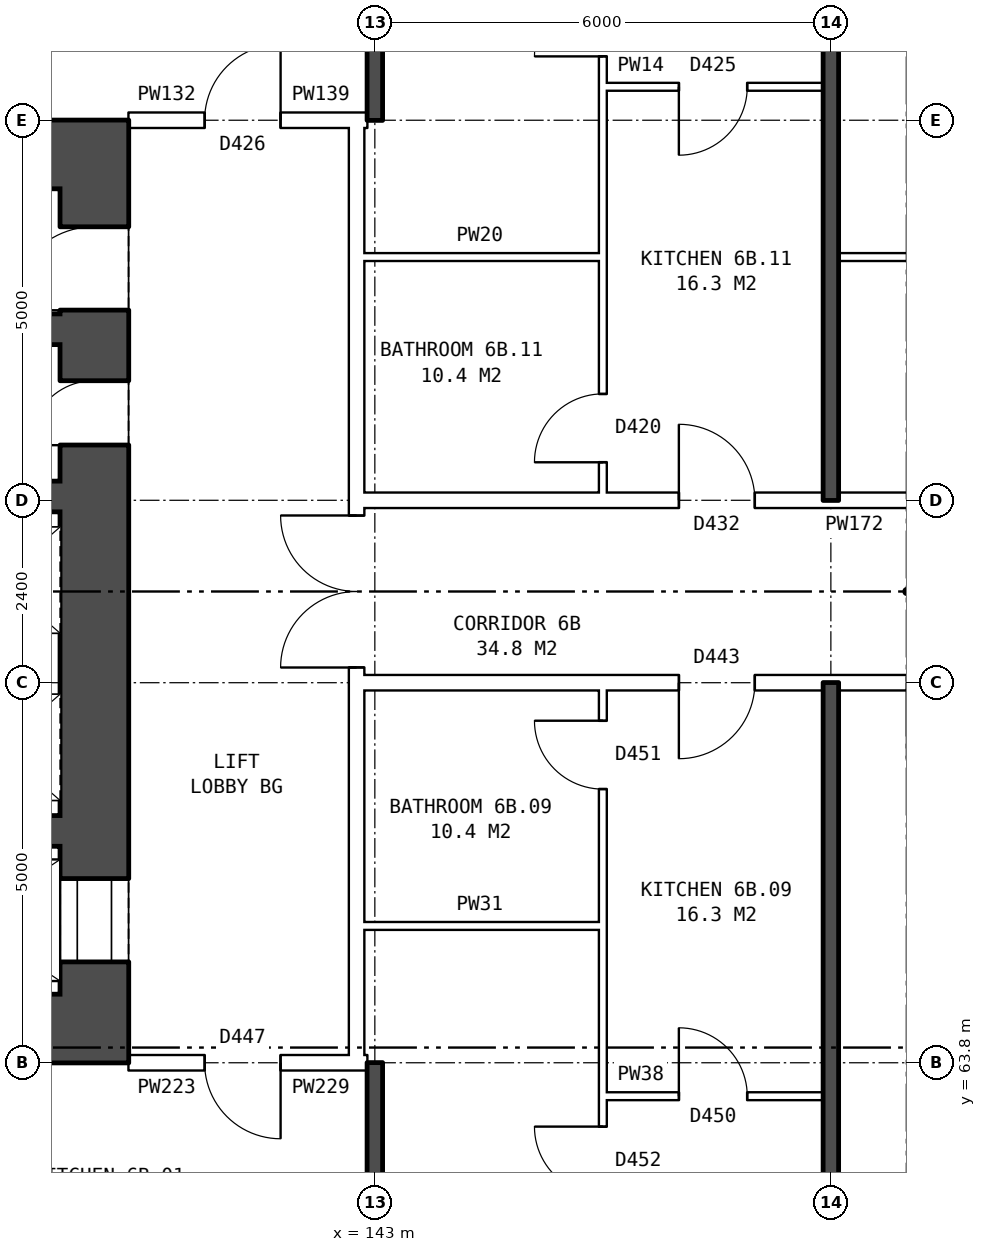
"""IFC4 building model, lengths in metres.
Left out: names, types, materials, properties, quantities, classifications, styles, units other than length and angle.
Written with IfcOpenShell. Run it as: python <this file> out.ifc"""

import sys

from ifc_helpers import new_model, si_unit, direction, frame, frame_2d, origin, place, context, subcontext, project, spatial, rectangle, extrude, element, fill, save


model = new_model("IFC4")
c1 = context("Model", 3, precision=1e-05, world=origin(), true_north=direction((0.0, 1.0)))
c2 = subcontext(c1, "Body", "Model", "MODEL_VIEW")
j1 = project(units=[si_unit("LENGTHUNIT", "METRE"), si_unit("PLANEANGLEUNIT", "RADIAN")], contexts=[c1])
p1 = place(None, origin())
s1 = spatial("IfcSite", under=j1, at=p1, CompositionType="ELEMENT")
p2 = place(p1, origin())
s2 = spatial("IfcBuilding", under=s1, at=p2, CompositionType="ELEMENT")
p3 = place(p2, frame((0.0, 0.0, 25.7)))
s3 = spatial("IfcBuildingStorey", under=s2, at=p3, CompositionType="ELEMENT", Elevation=25.7)
p4 = place(p3, frame((139.31, 64.7, 0.0), z_axis=(0.0, 0.0, 1.0), x_axis=(0.0, 1.0, 0.0)))
e1 = element("IfcWall", 1, at=p4, inside=s3, PredefinedType="SHEAR", context=c2, shape_type="SweptSolid", body=[
    extrude(rectangle(XDim=10.6, YDim=0.9, at=frame_2d((5.3, 0.0))), origin(), (0.0, 0.0, 1.0), 2.85),
])
p5 = place(p4, frame((0.425, 0.0, 0.0)))
e2 = element("IfcOpeningElement", 2, at=p5, cuts=e1, PredefinedType="OPENING", context=c2, shape_type="SweptSolid", body=[
    extrude(rectangle(XDim=1.1, YDim=2.1, at=frame_2d((0.55, 1.05))), frame((0.0, 0.46, 0.0), z_axis=(0.0, -1.0, 0.0), x_axis=(1.0, 0.0, 0.0)), (0.0, 0.0, 1.0), 0.92),
])
p6 = place(p4, frame((9.0, 0.0, 0.0)))
e3 = element("IfcOpeningElement", 3, at=p6, cuts=e1, PredefinedType="OPENING", context=c2, shape_type="SweptSolid", body=[
    extrude(rectangle(XDim=1.1, YDim=2.1, at=frame_2d((0.55, 1.05))), frame((0.0, 0.46, 0.0), z_axis=(0.0, -1.0, 0.0), x_axis=(1.0, 0.0, 0.0)), (0.0, 0.0, 1.0), 0.92),
])
p7 = place(p4, frame((7.225, 0.0, 0.0)))
e4 = element("IfcOpeningElement", 4, at=p7, cuts=e1, PredefinedType="OPENING", context=c2, shape_type="SweptSolid", body=[
    extrude(rectangle(XDim=0.85, YDim=2.1, at=frame_2d((0.425, 1.05))), frame((0.0, 0.46, 0.0), z_axis=(0.0, -1.0, 0.0), x_axis=(1.0, 0.0, 0.0)), (0.0, 0.0, 1.0), 0.92),
])
for number, where, z_axis, x_axis in (
    (5, (139.76, 64.25, 0.0), (0.0, 0.0, 1.0), (-1.0, 0.0, 0.0)),
    (6, (139.76, 75.75, 0.0), (0.0, 0.0, 1.0), (-1.0, 0.0, 0.0)),
):
    element("IfcWall", number, at=place(p3, frame(where, z_axis=z_axis, x_axis=x_axis)), inside=s3, PredefinedType="SHEAR", context=c2, shape_type="SweptSolid", body=[
        extrude(rectangle(XDim=8.4, YDim=0.9, at=frame_2d((4.2, 0.0))), origin(), (0.0, 0.0, 1.0), 2.85),
    ])
p8 = place(p3, frame((138.86, 66.85, 0.0), z_axis=(0.0, 0.0, 1.0), x_axis=(-1.0, 0.0, 0.0)))
e7 = element("IfcWall", 7, at=p8, inside=s3, PredefinedType="SHEAR", context=c2, shape_type="SweptSolid", body=[
    extrude(rectangle(XDim=3.7, YDim=0.4, at=frame_2d((1.85, 0.0))), origin(), (0.0, 0.0, 1.0), 2.85),
])
p9 = place(p3, frame((138.86, 71.25, 0.0), z_axis=(0.0, 0.0, 1.0), x_axis=(-1.0, 0.0, 0.0)))
e8 = element("IfcWall", 8, at=p9, inside=s3, PredefinedType="SHEAR", context=c2, shape_type="SweptSolid", body=[
    extrude(rectangle(XDim=6.6, YDim=0.4, at=frame_2d((3.3, 0.0))), origin(), (0.0, 0.0, 1.0), 2.85),
])
p10 = place(p9, frame((4.25, 0.0, 0.0)))
e9 = element("IfcOpeningElement", 9, at=p10, cuts=e8, PredefinedType="OPENING", context=c2, shape_type="SweptSolid", body=[
    extrude(rectangle(XDim=1.1, YDim=2.1, at=frame_2d((0.55, 1.05))), frame((0.0, 0.21, 0.0), z_axis=(0.0, -1.0, 0.0), x_axis=(1.0, 0.0, 0.0)), (0.0, 0.0, 1.0), 0.42),
])
p11 = place(p9, frame((2.475, 0.0, 0.0)))
e10 = element("IfcOpeningElement", 10, at=p11, cuts=e8, PredefinedType="OPENING", context=c2, shape_type="SweptSolid", body=[
    extrude(rectangle(XDim=0.85, YDim=2.1, at=frame_2d((0.425, 1.05))), frame((0.0, 0.21, 0.0), z_axis=(0.0, -1.0, 0.0), x_axis=(1.0, 0.0, 0.0)), (0.0, 0.0, 1.0), 0.42),
])
p12 = place(p3, frame((138.86, 73.45, 0.0), z_axis=(0.0, 0.0, 1.0), x_axis=(-1.0, 0.0, 0.0)))
e11 = element("IfcWall", 11, at=p12, inside=s3, PredefinedType="SHEAR", context=c2, shape_type="SweptSolid", body=[
    extrude(rectangle(XDim=1.95, YDim=0.4, at=frame_2d((0.975, 0.0))), origin(), (0.0, 0.0, 1.0), 2.85),
])
p13 = place(p3, frame((142.76, 63.9, 0.0), z_axis=(0.0, 0.0, 1.0), x_axis=(0.0, 1.0, 0.0)))
e12 = element("IfcWall", 12, at=p13, inside=s3, PredefinedType="PARTITIONING", context=c2, shape_type="SweptSolid", body=[
    extrude(rectangle(XDim=12.2, YDim=0.2, at=frame_2d((6.1, 0.0))), origin(), (0.0, 0.0, 1.0), 2.85),
])
p14 = place(p13, frame((5.1, 0.0, 0.0)))
e13 = element("IfcOpeningElement", 13, at=p14, cuts=e12, PredefinedType="OPENING", context=c2, shape_type="SweptSolid", body=[
    extrude(rectangle(XDim=2.0, YDim=2.1, at=frame_2d((1.0, 1.05))), frame((0.0, 0.11, 0.0), z_axis=(0.0, -1.0, 0.0), x_axis=(1.0, 0.0, 0.0)), (0.0, 0.0, 1.0), 0.22),
])
p15 = place(p3, frame((146.0, 63.36, 0.0), z_axis=(0.0, 0.0, 1.0), x_axis=(1.0, 0.0, 0.0)))
e14 = element("IfcWall", 14, at=p15, inside=s3, PredefinedType="PARTITIONING", context=c2, shape_type="SweptSolid", body=[
    extrude(rectangle(XDim=2.9, YDim=0.1, at=frame_2d((1.45, 0.0))), origin(), (0.0, 0.0, 1.0), 2.85),
])
p16 = place(p15, frame((1.0, 0.0, 0.0)))
e15 = element("IfcOpeningElement", 15, at=p16, cuts=e14, PredefinedType="OPENING", context=c2, shape_type="SweptSolid", body=[
    extrude(rectangle(XDim=0.9, YDim=2.1, at=frame_2d((0.45, 1.05))), frame((0.0, 0.06, 0.0), z_axis=(0.0, -1.0, 0.0), x_axis=(1.0, 0.0, 0.0)), (0.0, 0.0, 1.0), 0.12),
])
p17 = place(p3, frame((139.76, 63.8, 0.0), z_axis=(0.0, 0.0, 1.0), x_axis=(1.0, 0.0, 0.0)))
e16 = element("IfcWall", 16, at=p17, inside=s3, PredefinedType="PARTITIONING", context=c2, shape_type="SweptSolid", body=[
    extrude(rectangle(XDim=3.0, YDim=0.2, at=frame_2d((1.5, 0.0))), origin(), (0.0, 0.0, 1.0), 2.85),
])
p18 = place(p17, frame((1.0, 0.0, 0.0)))
e17 = element("IfcOpeningElement", 17, at=p18, cuts=e16, PredefinedType="OPENING", context=c2, shape_type="SweptSolid", body=[
    extrude(rectangle(XDim=1.0, YDim=2.1, at=frame_2d((0.5, 1.05))), frame((0.0, 0.11, 0.0), z_axis=(0.0, -1.0, 0.0), x_axis=(1.0, 0.0, 0.0)), (0.0, 0.0, 1.0), 0.22),
])
p19 = place(p3, frame((142.76, 63.8, 0.0), z_axis=(0.0, 0.0, 1.0), x_axis=(1.0, 0.0, 0.0)))
e18 = element("IfcWall", 18, at=p19, inside=s3, PredefinedType="PARTITIONING", context=c2, shape_type="SweptSolid", body=[
    extrude(rectangle(XDim=0.14, YDim=0.2, at=frame_2d((0.07, 0.0))), origin(), (0.0, 0.0, 1.0), 2.85),
])
p20 = place(p3, frame((142.76, 65.6, 0.0), z_axis=(0.0, 0.0, 1.0), x_axis=(1.0, 0.0, 0.0)))
e19 = element("IfcWall", 19, at=p20, inside=s3, PredefinedType="PARTITIONING", context=c2, shape_type="SweptSolid", body=[
    extrude(rectangle(XDim=3.24, YDim=0.1, at=frame_2d((1.62, 0.0))), origin(), (0.0, 0.0, 1.0), 2.85),
])
p21 = place(p3, frame((142.76, 68.8, 0.0), z_axis=(0.0, 0.0, 1.0), x_axis=(1.0, 0.0, 0.0)))
e20 = element("IfcWall", 20, at=p21, inside=s3, PredefinedType="PARTITIONING", context=c2, shape_type="SweptSolid", body=[
    extrude(rectangle(XDim=14.48, YDim=0.2, at=frame_2d((7.24, 0.0))), origin(), (0.0, 0.0, 1.0), 2.85),
])
p22 = place(p21, frame((4.24, 0.0, 0.0)))
e21 = element("IfcOpeningElement", 21, at=p22, cuts=e20, PredefinedType="OPENING", context=c2, shape_type="SweptSolid", body=[
    extrude(rectangle(XDim=1.0, YDim=2.1, at=frame_2d((0.5, 1.05))), frame((0.0, 0.11, 0.0), z_axis=(0.0, -1.0, 0.0), x_axis=(1.0, 0.0, 0.0)), (0.0, 0.0, 1.0), 0.22),
])
p23 = place(p21, frame((7.24, 0.0, 0.0)))
e22 = element("IfcOpeningElement", 22, at=p23, cuts=e20, PredefinedType="OPENING", context=c2, shape_type="SweptSolid", body=[
    extrude(rectangle(XDim=1.0, YDim=2.1, at=frame_2d((0.5, 1.05))), frame((0.0, 0.11, 0.0), z_axis=(0.0, -1.0, 0.0), x_axis=(1.0, 0.0, 0.0)), (0.0, 0.0, 1.0), 0.22),
])
p24 = place(p3, frame((142.76, 71.2, 0.0), z_axis=(0.0, 0.0, 1.0), x_axis=(1.0, 0.0, 0.0)))
e23 = element("IfcWall", 23, at=p24, inside=s3, PredefinedType="PARTITIONING", context=c2, shape_type="SweptSolid", body=[
    extrude(rectangle(XDim=14.48, YDim=0.2, at=frame_2d((7.24, 0.0))), origin(), (0.0, 0.0, 1.0), 2.85),
])
p25 = place(p24, frame((4.24, 0.0, 0.0)))
e24 = element("IfcOpeningElement", 24, at=p25, cuts=e23, PredefinedType="OPENING", context=c2, shape_type="SweptSolid", body=[
    extrude(rectangle(XDim=1.0, YDim=2.1, at=frame_2d((0.5, 1.05))), frame((0.0, 0.11, 0.0), z_axis=(0.0, -1.0, 0.0), x_axis=(1.0, 0.0, 0.0)), (0.0, 0.0, 1.0), 0.22),
])
p26 = place(p24, frame((10.24, 0.0, 0.0)))
e25 = element("IfcOpeningElement", 25, at=p26, cuts=e23, PredefinedType="OPENING", context=c2, shape_type="SweptSolid", body=[
    extrude(rectangle(XDim=1.0, YDim=2.1, at=frame_2d((0.5, 1.05))), frame((0.0, 0.11, 0.0), z_axis=(0.0, -1.0, 0.0), x_axis=(1.0, 0.0, 0.0)), (0.0, 0.0, 1.0), 0.22),
])
p27 = place(p3, frame((142.76, 74.4, 0.0), z_axis=(0.0, 0.0, 1.0), x_axis=(1.0, 0.0, 0.0)))
e26 = element("IfcWall", 26, at=p27, inside=s3, PredefinedType="PARTITIONING", context=c2, shape_type="SweptSolid", body=[
    extrude(rectangle(XDim=3.24, YDim=0.1, at=frame_2d((1.62, 0.0))), origin(), (0.0, 0.0, 1.0), 2.85),
])
p28 = place(p3, frame((149.1, 74.4, 0.0), z_axis=(0.0, 0.0, 1.0), x_axis=(1.0, 0.0, 0.0)))
e27 = element("IfcWall", 27, at=p28, inside=s3, PredefinedType="PARTITIONING", context=c2, shape_type="SweptSolid", body=[
    extrude(rectangle(XDim=2.9, YDim=0.1, at=frame_2d((1.45, 0.0))), origin(), (0.0, 0.0, 1.0), 2.85),
])
p29 = place(p3, frame((139.76, 76.2, 0.0), z_axis=(0.0, 0.0, 1.0), x_axis=(1.0, 0.0, 0.0)))
e28 = element("IfcWall", 28, at=p29, inside=s3, PredefinedType="PARTITIONING", context=c2, shape_type="SweptSolid", body=[
    extrude(rectangle(XDim=3.0, YDim=0.2, at=frame_2d((1.5, 0.0))), origin(), (0.0, 0.0, 1.0), 2.85),
])
p30 = place(p29, frame((1.0, 0.0, 0.0)))
e29 = element("IfcOpeningElement", 29, at=p30, cuts=e28, PredefinedType="OPENING", context=c2, shape_type="SweptSolid", body=[
    extrude(rectangle(XDim=1.0, YDim=2.1, at=frame_2d((0.5, 1.05))), frame((0.0, 0.11, 0.0), z_axis=(0.0, -1.0, 0.0), x_axis=(1.0, 0.0, 0.0)), (0.0, 0.0, 1.0), 0.22),
])
p31 = place(p3, frame((142.76, 76.2, 0.0), z_axis=(0.0, 0.0, 1.0), x_axis=(1.0, 0.0, 0.0)))
e30 = element("IfcWall", 30, at=p31, inside=s3, PredefinedType="PARTITIONING", context=c2, shape_type="SweptSolid", body=[
    extrude(rectangle(XDim=0.14, YDim=0.2, at=frame_2d((0.07, 0.0))), origin(), (0.0, 0.0, 1.0), 2.85),
])
p32 = place(p3, frame((146.0, 76.64, 0.0), z_axis=(0.0, 0.0, 1.0), x_axis=(1.0, 0.0, 0.0)))
e31 = element("IfcWall", 31, at=p32, inside=s3, PredefinedType="PARTITIONING", context=c2, shape_type="SweptSolid", body=[
    extrude(rectangle(XDim=2.9, YDim=0.1, at=frame_2d((1.45, 0.0))), origin(), (0.0, 0.0, 1.0), 2.85),
])
p33 = place(p32, frame((1.0, 0.0, 0.0)))
e32 = element("IfcOpeningElement", 32, at=p33, cuts=e31, PredefinedType="OPENING", context=c2, shape_type="SweptSolid", body=[
    extrude(rectangle(XDim=0.9, YDim=2.1, at=frame_2d((0.45, 1.05))), frame((0.0, 0.06, 0.0), z_axis=(0.0, -1.0, 0.0), x_axis=(1.0, 0.0, 0.0)), (0.0, 0.0, 1.0), 0.12),
])
for number, where, z_axis, x_axis in (
    (33, (143.0, 54.36, 0.0), (0.0, 0.0, 1.0), (0.0, 1.0, 0.0)),
    (34, (143.0, 76.2, 0.0), (0.0, 0.0, 1.0), (0.0, 1.0, 0.0)),
):
    element("IfcWall", number, at=place(p3, frame(where, z_axis=z_axis, x_axis=x_axis)), inside=s3, PredefinedType="SOLIDWALL", context=c2, shape_type="SweptSolid", body=[
        extrude(rectangle(XDim=9.44, YDim=0.2, at=frame_2d((4.72, 0.0))), origin(), (0.0, 0.0, 1.0), 2.85),
    ])
p34 = place(p3, frame((146.0, 54.36, 0.0), z_axis=(0.0, 0.0, 1.0), x_axis=(0.0, 1.0, 0.0)))
e35 = element("IfcWall", 35, at=p34, inside=s3, PredefinedType="PARTITIONING", context=c2, shape_type="SweptSolid", body=[
    extrude(rectangle(XDim=14.34, YDim=0.1, at=frame_2d((7.17, 0.0))), origin(), (0.0, 0.0, 1.0), 2.85),
])
p35 = place(p34, frame((7.7, 0.0, 0.0)))
e36 = element("IfcOpeningElement", 36, at=p35, cuts=e35, PredefinedType="OPENING", context=c2, shape_type="SweptSolid", body=[
    extrude(rectangle(XDim=0.9, YDim=2.1, at=frame_2d((0.45, 1.05))), frame((0.0, 0.06, 0.0), z_axis=(0.0, -1.0, 0.0), x_axis=(1.0, 0.0, 0.0)), (0.0, 0.0, 1.0), 0.12),
])
p36 = place(p34, frame((13.04, 0.0, 0.0)))
e37 = element("IfcOpeningElement", 37, at=p36, cuts=e35, PredefinedType="OPENING", context=c2, shape_type="SweptSolid", body=[
    extrude(rectangle(XDim=0.9, YDim=2.1, at=frame_2d((0.45, 1.05))), frame((0.0, 0.06, 0.0), z_axis=(0.0, -1.0, 0.0), x_axis=(1.0, 0.0, 0.0)), (0.0, 0.0, 1.0), 0.12),
])
p37 = place(p3, frame((146.0, 71.3, 0.0), z_axis=(0.0, 0.0, 1.0), x_axis=(0.0, 1.0, 0.0)))
e38 = element("IfcWall", 38, at=p37, inside=s3, PredefinedType="PARTITIONING", context=c2, shape_type="SweptSolid", body=[
    extrude(rectangle(XDim=14.34, YDim=0.1, at=frame_2d((7.17, 0.0))), origin(), (0.0, 0.0, 1.0), 2.85),
])
p38 = place(p37, frame((5.74, 0.0, 0.0)))
e39 = element("IfcOpeningElement", 39, at=p38, cuts=e38, PredefinedType="OPENING", context=c2, shape_type="SweptSolid", body=[
    extrude(rectangle(XDim=0.9, YDim=2.1, at=frame_2d((0.45, 1.05))), frame((0.0, 0.06, 0.0), z_axis=(0.0, -1.0, 0.0), x_axis=(1.0, 0.0, 0.0)), (0.0, 0.0, 1.0), 0.12),
])
p39 = place(p37, frame((0.4, 0.0, 0.0)))
e40 = element("IfcOpeningElement", 40, at=p39, cuts=e38, PredefinedType="OPENING", context=c2, shape_type="SweptSolid", body=[
    extrude(rectangle(XDim=0.9, YDim=2.1, at=frame_2d((0.45, 1.05))), frame((0.0, 0.06, 0.0), z_axis=(0.0, -1.0, 0.0), x_axis=(1.0, 0.0, 0.0)), (0.0, 0.0, 1.0), 0.12),
])
for number, where, z_axis, x_axis in (
    (41, (149.0, 54.36, 0.0), (0.0, 0.0, 1.0), (0.0, 1.0, 0.0)),
    (42, (149.0, 71.2, 0.0), (0.0, 0.0, 1.0), (0.0, 1.0, 0.0)),
):
    element("IfcWall", number, at=place(p3, frame(where, z_axis=z_axis, x_axis=x_axis)), inside=s3, PredefinedType="SOLIDWALL", context=c2, shape_type="SweptSolid", body=[
        extrude(rectangle(XDim=14.44, YDim=0.2, at=frame_2d((7.22, 0.0))), origin(), (0.0, 0.0, 1.0), 2.85),
    ])
p40 = place(p5, origin())
e43 = element("IfcDoor", 43, at=p40, inside=s3, OperationType="DOUBLE_DOOR_SLIDING", PredefinedType="DOOR", context=c2, shape_type="SweptSolid", body=[
    extrude(rectangle(XDim=1.1, YDim=2.1, at=frame_2d((0.55, 1.05))), frame((0.0, 0.435, 0.0), z_axis=(0.0, -1.0, 0.0), x_axis=(1.0, 0.0, 0.0)), (0.0, 0.0, 1.0), 0.05),
])
fill(e2, e43)
p41 = place(p6, origin())
e44 = element("IfcDoor", 44, at=p41, inside=s3, OperationType="SINGLE_SWING_LEFT", PredefinedType="DOOR", context=c2, shape_type="SweptSolid", body=[
    extrude(rectangle(XDim=1.1, YDim=2.1, at=frame_2d((0.55, 1.05))), frame((0.0, 0.435, 0.0), z_axis=(0.0, -1.0, 0.0), x_axis=(1.0, 0.0, 0.0)), (0.0, 0.0, 1.0), 0.05),
])
fill(e3, e44)
p42 = place(p7, origin())
e45 = element("IfcDoor", 45, at=p42, inside=s3, OperationType="SINGLE_SWING_LEFT", PredefinedType="DOOR", context=c2, shape_type="SweptSolid", body=[
    extrude(rectangle(XDim=0.85, YDim=2.1, at=frame_2d((0.425, 1.05))), frame((0.0, 0.435, 0.0), z_axis=(0.0, -1.0, 0.0), x_axis=(1.0, 0.0, 0.0)), (0.0, 0.0, 1.0), 0.05),
])
fill(e4, e45)
p43 = place(p14, origin())
e46 = element("IfcDoor", 46, at=p43, inside=s3, OperationType="DOUBLE_DOOR_SINGLE_SWING", PredefinedType="DOOR", context=c2, shape_type="SweptSolid", body=[
    extrude(rectangle(XDim=2.0, YDim=2.1, at=frame_2d((1.0, 1.05))), frame((0.0, 0.025, 0.0), z_axis=(0.0, -1.0, 0.0), x_axis=(1.0, 0.0, 0.0)), (0.0, 0.0, 1.0), 0.05),
])
fill(e13, e46)
p44 = place(p18, frame((1.0, 0.0, 0.0), z_axis=(0.0, 0.0, 1.0), x_axis=(-1.0, 0.0, 0.0)))
e47 = element("IfcDoor", 47, at=p44, inside=s3, OperationType="SINGLE_SWING_LEFT", PredefinedType="DOOR", context=c2, shape_type="SweptSolid", body=[
    extrude(rectangle(XDim=1.0, YDim=2.1, at=frame_2d((0.5, 1.05))), frame((0.0, 0.025, 0.0), z_axis=(0.0, -1.0, 0.0), x_axis=(1.0, 0.0, 0.0)), (0.0, 0.0, 1.0), 0.05),
])
fill(e17, e47)
p45 = place(p30, origin())
e48 = element("IfcDoor", 48, at=p45, inside=s3, OperationType="SINGLE_SWING_RIGHT", PredefinedType="DOOR", context=c2, shape_type="SweptSolid", body=[
    extrude(rectangle(XDim=1.0, YDim=2.1, at=frame_2d((0.5, 1.05))), frame((0.0, 0.025, 0.0), z_axis=(0.0, -1.0, 0.0), x_axis=(1.0, 0.0, 0.0)), (0.0, 0.0, 1.0), 0.05),
])
fill(e29, e48)
p46 = place(p35, origin())
e49 = element("IfcDoor", 49, at=p46, inside=s3, OperationType="SINGLE_SWING_RIGHT", PredefinedType="DOOR", context=c2, shape_type="SweptSolid", body=[
    extrude(rectangle(XDim=0.9, YDim=2.1, at=frame_2d((0.45, 1.05))), frame((0.0, 0.025, 0.0), z_axis=(0.0, -1.0, 0.0), x_axis=(1.0, 0.0, 0.0)), (0.0, 0.0, 1.0), 0.05),
])
fill(e36, e49)
p47 = place(p22, frame((1.0, 0.0, 0.0), z_axis=(0.0, 0.0, 1.0), x_axis=(-1.0, 0.0, 0.0)))
e50 = element("IfcDoor", 50, at=p47, inside=s3, OperationType="SINGLE_SWING_RIGHT", PredefinedType="DOOR", context=c2, shape_type="SweptSolid", body=[
    extrude(rectangle(XDim=1.0, YDim=2.1, at=frame_2d((0.5, 1.05))), frame((0.0, 0.025, 0.0), z_axis=(0.0, -1.0, 0.0), x_axis=(1.0, 0.0, 0.0)), (0.0, 0.0, 1.0), 0.05),
])
fill(e21, e50)
p48 = place(p16, origin())
e51 = element("IfcDoor", 51, at=p48, inside=s3, OperationType="SINGLE_SWING_LEFT", PredefinedType="DOOR", context=c2, shape_type="SweptSolid", body=[
    extrude(rectangle(XDim=0.9, YDim=2.1, at=frame_2d((0.45, 1.05))), frame((0.0, 0.025, 0.0), z_axis=(0.0, -1.0, 0.0), x_axis=(1.0, 0.0, 0.0)), (0.0, 0.0, 1.0), 0.05),
])
fill(e15, e51)
p49 = place(p36, origin())
e52 = element("IfcDoor", 52, at=p49, inside=s3, OperationType="SINGLE_SWING_RIGHT", PredefinedType="DOOR", context=c2, shape_type="SweptSolid", body=[
    extrude(rectangle(XDim=0.9, YDim=2.1, at=frame_2d((0.45, 1.05))), frame((0.0, 0.025, 0.0), z_axis=(0.0, -1.0, 0.0), x_axis=(1.0, 0.0, 0.0)), (0.0, 0.0, 1.0), 0.05),
])
fill(e37, e52)
p50 = place(p38, origin())
e53 = element("IfcDoor", 53, at=p50, inside=s3, OperationType="SINGLE_SWING_LEFT", PredefinedType="DOOR", context=c2, shape_type="SweptSolid", body=[
    extrude(rectangle(XDim=0.9, YDim=2.1, at=frame_2d((0.45, 1.05))), frame((0.0, 0.025, 0.0), z_axis=(0.0, -1.0, 0.0), x_axis=(1.0, 0.0, 0.0)), (0.0, 0.0, 1.0), 0.05),
])
fill(e39, e53)
p51 = place(p25, origin())
e54 = element("IfcDoor", 54, at=p51, inside=s3, OperationType="SINGLE_SWING_LEFT", PredefinedType="DOOR", context=c2, shape_type="SweptSolid", body=[
    extrude(rectangle(XDim=1.0, YDim=2.1, at=frame_2d((0.5, 1.05))), frame((0.0, 0.025, 0.0), z_axis=(0.0, -1.0, 0.0), x_axis=(1.0, 0.0, 0.0)), (0.0, 0.0, 1.0), 0.05),
])
fill(e24, e54)
p52 = place(p33, frame((0.9, 0.0, 0.0), z_axis=(0.0, 0.0, 1.0), x_axis=(-1.0, 0.0, 0.0)))
e55 = element("IfcDoor", 55, at=p52, inside=s3, OperationType="SINGLE_SWING_RIGHT", PredefinedType="DOOR", context=c2, shape_type="SweptSolid", body=[
    extrude(rectangle(XDim=0.9, YDim=2.1, at=frame_2d((0.45, 1.05))), frame((0.0, 0.025, 0.0), z_axis=(0.0, -1.0, 0.0), x_axis=(1.0, 0.0, 0.0)), (0.0, 0.0, 1.0), 0.05),
])
fill(e32, e55)
p53 = place(p39, origin())
e56 = element("IfcDoor", 56, at=p53, inside=s3, OperationType="SINGLE_SWING_LEFT", PredefinedType="DOOR", context=c2, shape_type="SweptSolid", body=[
    extrude(rectangle(XDim=0.9, YDim=2.1, at=frame_2d((0.45, 1.05))), frame((0.0, 0.025, 0.0), z_axis=(0.0, -1.0, 0.0), x_axis=(1.0, 0.0, 0.0)), (0.0, 0.0, 1.0), 0.05),
])
fill(e40, e56)
save(model, sys.argv[1])
